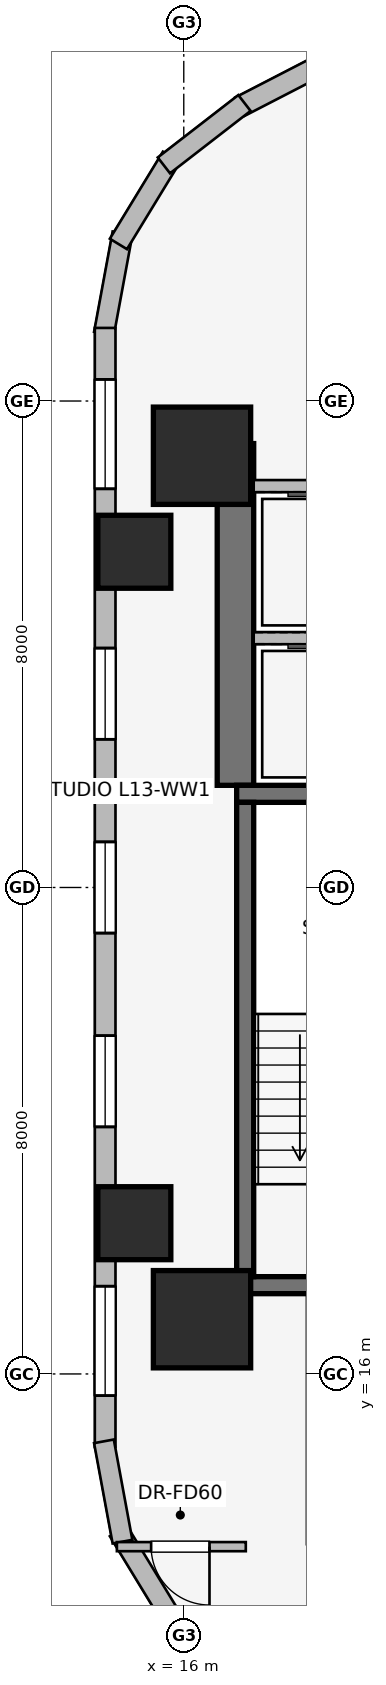
"""IFC4 building model, lengths in metres.
Left out: names, types, materials, properties, quantities, classifications, styles, units other than length and angle.
Written with IfcOpenShell. Run it as: python <this file> out.ifc"""

import sys

from ifc_helpers import new_model, si_unit, direction, frame, frame_2d, origin, origin_2d, place, context, subcontext, project, spatial, rectangle, extrude, element, fill, save


model = new_model("IFC4")
c1 = context("Model", 3, precision=1e-05, world=origin(), true_north=direction((0.0, 1.0)))
c2 = subcontext(c1, "Body", "Model", "MODEL_VIEW")
j1 = project(units=[si_unit("LENGTHUNIT", "METRE"), si_unit("PLANEANGLEUNIT", "RADIAN")], contexts=[c1])
p1 = place(None, origin())
s1 = spatial("IfcSite", under=j1, at=p1, CompositionType="ELEMENT")
p2 = place(p1, origin())
s2 = spatial("IfcBuilding", under=s1, at=p2, CompositionType="ELEMENT")
p3 = place(p2, frame((0.0, 0.0, 52.55)))
s3 = spatial("IfcBuildingStorey", under=s2, at=p3, CompositionType="ELEMENT", Elevation=52.55)
p4 = place(p3, frame((16.85, 25.68, 0.0), z_axis=(0.0, 0.0, 1.0), x_axis=(0.0, 1.0, 0.0)))
e1 = element("IfcWall", 1, at=p4, inside=s3, PredefinedType="SHEAR", context=c2, shape_type="SweptSolid", body=[
    extrude(rectangle(XDim=5.62, YDim=0.6, at=frame_2d((2.81, 0.0))), origin(), (0.0, 0.0, 1.0), 3.65),
])
for number, where, z_axis, x_axis in (
    (2, (16.87, 17.46, 0.0), (0.0, 0.0, 1.0), (1.0, 0.0, 0.0)),
    (3, (20.63, 25.54, 0.0), (0.0, 0.0, 1.0), (-1.0, 0.0, 0.0)),
):
    element("IfcWall", number, at=place(p3, frame(where, z_axis=z_axis, x_axis=x_axis)), inside=s3, PredefinedType="SHEAR", context=c2, shape_type="SweptSolid", body=[
        extrude(rectangle(XDim=3.76, YDim=0.28, at=frame_2d((1.88, 0.0))), origin(), (0.0, 0.0, 1.0), 3.65),
    ])
p5 = place(p3, frame((17.01, 25.4, 0.0), z_axis=(0.0, 0.0, 1.0), x_axis=(0.0, -1.0, 0.0)))
e4 = element("IfcWall", 4, at=p5, inside=s3, PredefinedType="SHEAR", context=c2, shape_type="SweptSolid", body=[
    extrude(rectangle(XDim=7.8, YDim=0.28, at=frame_2d((3.9, 0.0))), origin(), (0.0, 0.0, 1.0), 3.65),
])
for number, where, z_axis, x_axis in (
    (5, (16.3, 16.9, 0.0), (0.0, 0.0, 1.0), (1.0, 0.0, 0.0)),
    (6, (16.3, 31.1, 0.0), (0.0, 0.0, 1.0), (1.0, 0.0, 0.0)),
):
    element("IfcColumn", number, at=place(p3, frame(where, z_axis=z_axis, x_axis=x_axis)), inside=s3, PredefinedType="COLUMN", context=c2, shape_type="SweptSolid", body=[
        extrude(rectangle(XDim=1.6, YDim=1.6, at=origin_2d()), origin(), (0.0, 0.0, 1.0), 3.65),
    ])
for number, where, z_axis, x_axis in (
    (7, (15.187, 29.521, 0.0), (0.0, 0.0, 1.0), (1.0, 0.0, 0.0)),
    (8, (15.187, 18.479, 0.0), (0.0, 0.0, 1.0), (1.0, 0.0, 0.0)),
):
    element("IfcColumn", number, at=place(p3, frame(where, z_axis=z_axis, x_axis=x_axis)), inside=s3, PredefinedType="COLUMN", context=c2, shape_type="SweptSolid", body=[
        extrude(rectangle(XDim=1.2, YDim=1.2, at=origin_2d()), origin(), (0.0, 0.0, 1.0), 3.65),
    ])
p6 = place(p3, frame((16.924, 36.841, 0.0), z_axis=(0.0, 0.0, 1.0), x_axis=(0.888634413993, 0.458616264721, 0.0)))
e9 = element("IfcWall", 9, at=p6, inside=s3, PredefinedType="STANDARD", context=c2, shape_type="SweptSolid", body=[
    extrude(rectangle(XDim=20.531, YDim=0.34, at=frame_2d((10.266, 0.0))), origin(), (0.0, 0.0, 1.0), 2.654),
])
p7 = place(p6, frame((2.161, 0.0, 0.75)))
e10 = element("IfcOpeningElement", 10, at=p7, cuts=e9, PredefinedType="OPENING", context=c2, shape_type="SweptSolid", body=[
    extrude(rectangle(XDim=1.05, YDim=1.4, at=frame_2d((0.525, 0.7))), frame((0.0, 0.18, 0.0), z_axis=(0.0, -1.0, 0.0), x_axis=(1.0, 0.0, 0.0)), (0.0, 0.0, 1.0), 0.36),
])
p8 = place(p6, frame((5.903, 0.0, 0.75)))
e11 = element("IfcOpeningElement", 11, at=p8, cuts=e9, PredefinedType="OPENING", context=c2, shape_type="SweptSolid", body=[
    extrude(rectangle(XDim=1.5, YDim=1.5, at=frame_2d((0.75, 0.75))), frame((0.0, 0.18, 0.0), z_axis=(0.0, -1.0, 0.0), x_axis=(1.0, 0.0, 0.0)), (0.0, 0.0, 1.0), 0.36),
])
p9 = place(p6, frame((9.516, 0.0, 0.75)))
e12 = element("IfcOpeningElement", 12, at=p9, cuts=e9, PredefinedType="OPENING", context=c2, shape_type="SweptSolid", body=[
    extrude(rectangle(XDim=1.5, YDim=1.5, at=frame_2d((0.75, 0.75))), frame((0.0, 0.18, 0.0), z_axis=(0.0, -1.0, 0.0), x_axis=(1.0, 0.0, 0.0)), (0.0, 0.0, 1.0), 0.36),
])
p10 = place(p6, frame((13.129, 0.0, 0.75)))
e13 = element("IfcOpeningElement", 13, at=p10, cuts=e9, PredefinedType="OPENING", context=c2, shape_type="SweptSolid", body=[
    extrude(rectangle(XDim=1.5, YDim=1.5, at=frame_2d((0.75, 0.75))), frame((0.0, 0.18, 0.0), z_axis=(0.0, -1.0, 0.0), x_axis=(1.0, 0.0, 0.0)), (0.0, 0.0, 1.0), 0.36),
])
p11 = place(p6, frame((17.476, 0.0, 0.75)))
e14 = element("IfcOpeningElement", 14, at=p11, cuts=e9, PredefinedType="OPENING", context=c2, shape_type="SweptSolid", body=[
    extrude(rectangle(XDim=1.05, YDim=1.4, at=frame_2d((0.525, 0.7))), frame((0.0, 0.18, 0.0), z_axis=(0.0, -1.0, 0.0), x_axis=(1.0, 0.0, 0.0)), (0.0, 0.0, 1.0), 0.36),
])
p12 = place(p3, frame((14.687, 33.108, 0.0), z_axis=(0.0, 0.0, 1.0), x_axis=(0.181714143354, 0.983351397063, 0.0)))
e15 = element("IfcWall", 15, at=p12, inside=s3, PredefinedType="STANDARD", context=c2, shape_type="SweptSolid", body=[
    extrude(rectangle(XDim=1.678, YDim=0.33, at=frame_2d((0.839, 0.0))), origin(), (0.0, 0.0, 1.0), 3.36),
])
p13 = place(p3, frame((14.925, 34.583, 0.0), z_axis=(0.0, 0.0, 1.0), x_axis=(0.520584129191, 0.853810379671, 0.0)))
e16 = element("IfcWall", 16, at=p13, inside=s3, PredefinedType="STANDARD", context=c2, shape_type="SweptSolid", body=[
    extrude(rectangle(XDim=1.677, YDim=0.33, at=frame_2d((0.838, 0.0))), origin(), (0.0, 0.0, 1.0), 3.36),
])
p14 = place(p3, frame((15.673, 35.875, 0.0), z_axis=(0.0, 0.0, 1.0), x_axis=(0.790691856293, 0.61221433207, 0.0)))
e17 = element("IfcWall", 17, at=p14, inside=s3, PredefinedType="STANDARD", context=c2, shape_type="SweptSolid", body=[
    extrude(rectangle(XDim=1.676, YDim=0.33, at=frame_2d((0.838, 0.0))), origin(), (0.0, 0.0, 1.0), 3.36),
])
p15 = place(p3, frame((14.707, 14.798, 0.0), z_axis=(0.0, 0.0, 1.0), x_axis=(0.0, 1.0, 0.0)))
e18 = element("IfcWall", 18, at=p15, inside=s3, PredefinedType="STANDARD", context=c2, shape_type="SweptSolid", body=[
    extrude(rectangle(XDim=18.404, YDim=0.34, at=frame_2d((9.202, 0.0))), origin(), (0.0, 0.0, 1.0), 2.654),
])
p16 = place(p15, frame((0.845, 0.0, 0.75)))
e19 = element("IfcOpeningElement", 19, at=p16, cuts=e18, PredefinedType="OPENING", context=c2, shape_type="SweptSolid", body=[
    extrude(rectangle(XDim=1.8, YDim=1.5, at=frame_2d((0.9, 0.75))), frame((0.0, 0.18, 0.0), z_axis=(0.0, -1.0, 0.0), x_axis=(1.0, 0.0, 0.0)), (0.0, 0.0, 1.0), 0.36),
])
p17 = place(p15, frame((5.265, 0.0, 0.75)))
e20 = element("IfcOpeningElement", 20, at=p17, cuts=e18, PredefinedType="OPENING", context=c2, shape_type="SweptSolid", body=[
    extrude(rectangle(XDim=1.5, YDim=1.5, at=frame_2d((0.75, 0.75))), frame((0.0, 0.18, 0.0), z_axis=(0.0, -1.0, 0.0), x_axis=(1.0, 0.0, 0.0)), (0.0, 0.0, 1.0), 0.36),
])
p18 = place(p15, frame((8.452, 0.0, 0.75)))
e21 = element("IfcOpeningElement", 21, at=p18, cuts=e18, PredefinedType="OPENING", context=c2, shape_type="SweptSolid", body=[
    extrude(rectangle(XDim=1.5, YDim=1.5, at=frame_2d((0.75, 0.75))), frame((0.0, 0.18, 0.0), z_axis=(0.0, -1.0, 0.0), x_axis=(1.0, 0.0, 0.0)), (0.0, 0.0, 1.0), 0.36),
])
p19 = place(p15, frame((11.639, 0.0, 0.75)))
e22 = element("IfcOpeningElement", 22, at=p19, cuts=e18, PredefinedType="OPENING", context=c2, shape_type="SweptSolid", body=[
    extrude(rectangle(XDim=1.5, YDim=1.5, at=frame_2d((0.75, 0.75))), frame((0.0, 0.18, 0.0), z_axis=(0.0, -1.0, 0.0), x_axis=(1.0, 0.0, 0.0)), (0.0, 0.0, 1.0), 0.36),
])
p20 = place(p15, frame((15.758, 0.0, 0.75)))
e23 = element("IfcOpeningElement", 23, at=p20, cuts=e18, PredefinedType="OPENING", context=c2, shape_type="SweptSolid", body=[
    extrude(rectangle(XDim=1.8, YDim=1.5, at=frame_2d((0.9, 0.75))), frame((0.0, 0.18, 0.0), z_axis=(0.0, -1.0, 0.0), x_axis=(1.0, 0.0, 0.0)), (0.0, 0.0, 1.0), 0.36),
])
p21 = place(p3, frame((16.998, 11.099, 0.0), z_axis=(0.0, 0.0, 1.0), x_axis=(-0.790691856293, 0.61221433207, 0.0)))
e24 = element("IfcWall", 24, at=p21, inside=s3, PredefinedType="STANDARD", context=c2, shape_type="SweptSolid", body=[
    extrude(rectangle(XDim=1.676, YDim=0.33, at=frame_2d((0.838, 0.0))), origin(), (0.0, 0.0, 1.0), 3.36),
])
p22 = place(p3, frame((15.798, 11.985, 0.0), z_axis=(0.0, 0.0, 1.0), x_axis=(-0.520584129191, 0.853810379671, 0.0)))
e25 = element("IfcWall", 25, at=p22, inside=s3, PredefinedType="STANDARD", context=c2, shape_type="SweptSolid", body=[
    extrude(rectangle(XDim=1.677, YDim=0.33, at=frame_2d((0.838, 0.0))), origin(), (0.0, 0.0, 1.0), 3.36),
])
p23 = place(p3, frame((14.992, 13.242, 0.0), z_axis=(0.0, 0.0, 1.0), x_axis=(-0.181714143354, 0.983351397063, 0.0)))
e26 = element("IfcWall", 26, at=p23, inside=s3, PredefinedType="STANDARD", context=c2, shape_type="SweptSolid", body=[
    extrude(rectangle(XDim=1.678, YDim=0.33, at=frame_2d((0.839, 0.0))), origin(), (0.0, 0.0, 1.0), 3.36),
])
p24 = place(p3, frame((17.15, 28.1, 0.0), z_axis=(0.0, 0.0, 1.0), x_axis=(1.0, 0.0, 0.0)))
e27 = element("IfcWall", 27, at=p24, inside=s3, PredefinedType="PARTITIONING", context=c2, shape_type="SweptSolid", body=[
    extrude(rectangle(XDim=2.5, YDim=0.2, at=frame_2d((1.25, 0.0))), origin(), (0.0, 0.0, 1.0), 3.36),
])
p25 = place(p3, frame((19.65, 30.6, 0.0), z_axis=(0.0, 0.0, 1.0), x_axis=(-1.0, 0.0, 0.0)))
e28 = element("IfcWall", 28, at=p25, inside=s3, PredefinedType="PARTITIONING", context=c2, shape_type="SweptSolid", body=[
    extrude(rectangle(XDim=2.5, YDim=0.2, at=frame_2d((1.25, 0.0))), origin(), (0.0, 0.0, 1.0), 2.26),
])
p26 = place(p3, frame((17.02, 13.16, 0.0), z_axis=(0.0, 0.0, 1.0), x_axis=(-1.0, 0.0, 0.0)))
e29 = element("IfcWall", 29, at=p26, inside=s3, PredefinedType="PARTITIONING", context=c2, shape_type="SweptSolid", body=[
    extrude(rectangle(XDim=2.12, YDim=0.15, at=frame_2d((1.06, 0.0))), origin(), (0.0, 0.0, 1.0), 3.36),
])
p27 = place(p26, frame((0.597, 0.0, 0.0)))
e30 = element("IfcOpeningElement", 30, at=p27, cuts=e29, PredefinedType="OPENING", context=c2, shape_type="SweptSolid", body=[
    extrude(rectangle(XDim=0.96, YDim=2.0, at=frame_2d((0.48, 1.0))), frame((0.0, 0.085, 0.0), z_axis=(0.0, -1.0, 0.0), x_axis=(1.0, 0.0, 0.0)), (0.0, 0.0, 1.0), 0.17),
])
p28 = place(p16, origin())
e31 = element("IfcWindow", 31, at=p28, inside=s3, PartitioningType="SINGLE_PANEL", PredefinedType="WINDOW", context=c2, shape_type="SweptSolid", body=[
    extrude(rectangle(XDim=1.8, YDim=1.5, at=frame_2d((0.9, 0.75))), frame((0.0, 0.03, 0.0), z_axis=(0.0, -1.0, 0.0), x_axis=(1.0, 0.0, 0.0)), (0.0, 0.0, 1.0), 0.06),
])
fill(e19, e31)
p29 = place(p17, origin())
e32 = element("IfcWindow", 32, at=p29, inside=s3, PartitioningType="SINGLE_PANEL", PredefinedType="WINDOW", context=c2, shape_type="SweptSolid", body=[
    extrude(rectangle(XDim=1.5, YDim=1.5, at=frame_2d((0.75, 0.75))), frame((0.0, 0.03, 0.0), z_axis=(0.0, -1.0, 0.0), x_axis=(1.0, 0.0, 0.0)), (0.0, 0.0, 1.0), 0.06),
])
fill(e20, e32)
p30 = place(p18, origin())
e33 = element("IfcWindow", 33, at=p30, inside=s3, PartitioningType="SINGLE_PANEL", PredefinedType="WINDOW", context=c2, shape_type="SweptSolid", body=[
    extrude(rectangle(XDim=1.5, YDim=1.5, at=frame_2d((0.75, 0.75))), frame((0.0, 0.03, 0.0), z_axis=(0.0, -1.0, 0.0), x_axis=(1.0, 0.0, 0.0)), (0.0, 0.0, 1.0), 0.06),
])
fill(e21, e33)
p31 = place(p19, origin())
e34 = element("IfcWindow", 34, at=p31, inside=s3, PartitioningType="SINGLE_PANEL", PredefinedType="WINDOW", context=c2, shape_type="SweptSolid", body=[
    extrude(rectangle(XDim=1.5, YDim=1.5, at=frame_2d((0.75, 0.75))), frame((0.0, 0.03, 0.0), z_axis=(0.0, -1.0, 0.0), x_axis=(1.0, 0.0, 0.0)), (0.0, 0.0, 1.0), 0.06),
])
fill(e22, e34)
p32 = place(p20, origin())
e35 = element("IfcWindow", 35, at=p32, inside=s3, PartitioningType="SINGLE_PANEL", PredefinedType="WINDOW", context=c2, shape_type="SweptSolid", body=[
    extrude(rectangle(XDim=1.8, YDim=1.5, at=frame_2d((0.9, 0.75))), frame((0.0, 0.03, 0.0), z_axis=(0.0, -1.0, 0.0), x_axis=(1.0, 0.0, 0.0)), (0.0, 0.0, 1.0), 0.06),
])
fill(e23, e35)
p33 = place(p27, origin())
e36 = element("IfcDoor", 36, at=p33, inside=s3, OperationType="SINGLE_SWING_LEFT", PredefinedType="DOOR", context=c2, shape_type="SweptSolid", body=[
    extrude(rectangle(XDim=0.96, YDim=2.0, at=frame_2d((0.48, 1.0))), frame((0.0, 0.025, 0.0), z_axis=(0.0, -1.0, 0.0), x_axis=(1.0, 0.0, 0.0)), (0.0, 0.0, 1.0), 0.05),
])
fill(e30, e36)
save(model, sys.argv[1])
